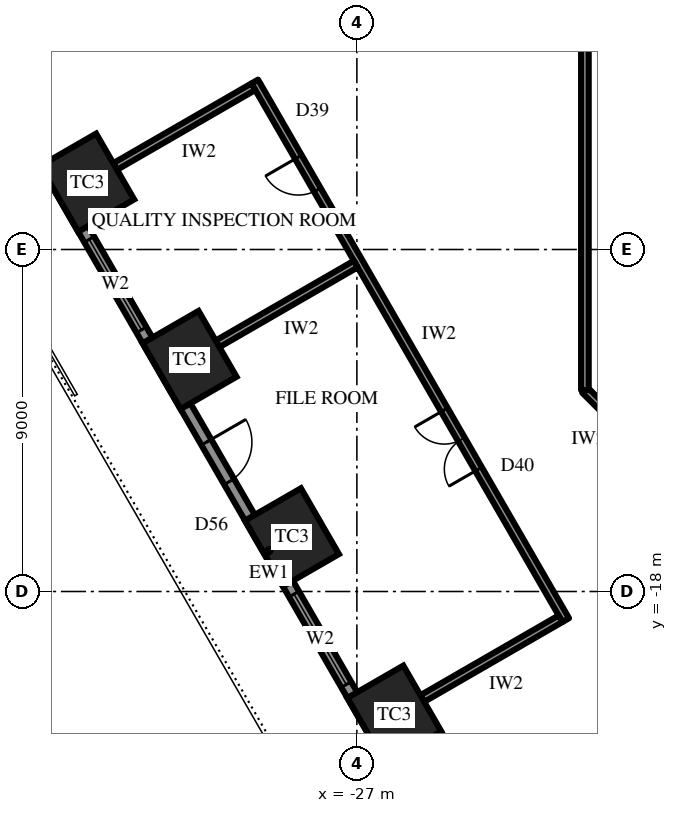
"""IFC4 building model, lengths in metres.
Left out: names, types, materials, properties, quantities, classifications, styles, units other than length and angle.
Written with IfcOpenShell. Run it as: python <this file> out.ifc"""

import sys

from ifc_helpers import new_model, si_unit, direction, frame, frame_2d, origin, origin_2d, place, context, subcontext, project, spatial, rectangle, extrude, element, fill, save


model = new_model("IFC4")
c1 = context("Model", 3, precision=1e-05, world=origin(), true_north=direction((0.0, 1.0)))
c2 = subcontext(c1, "Body", "Model", "MODEL_VIEW")
j1 = project(units=[si_unit("LENGTHUNIT", "METRE"), si_unit("PLANEANGLEUNIT", "RADIAN")], contexts=[c1])
p1 = place(None, origin())
s1 = spatial("IfcSite", under=j1, at=p1, CompositionType="ELEMENT")
p2 = place(p1, origin())
s2 = spatial("IfcBuilding", under=s1, at=p2, CompositionType="ELEMENT")
p3 = place(p2, frame((0.0, 0.0, 69.7)))
s3 = spatial("IfcBuildingStorey", under=s2, at=p3, CompositionType="ELEMENT", Elevation=69.7)
for number, where, z_axis, x_axis in (
    (1, (-34.097, -7.242, 0.0), (0.0, 0.0, 1.0), (0.5, -0.866, 0.0)),
    (2, (-31.403, -11.908, 0.0), (0.0, 0.0, 1.0), (0.5, -0.866, 0.0)),
    (3, (-28.709, -16.575, 0.0), (0.0, 0.0, 1.0), (0.5, -0.866, 0.0)),
    (4, (-26.014, -21.242, 0.0), (0.0, 0.0, 1.0), (0.5, -0.866, 0.0)),
):
    element("IfcColumn", number, at=place(p3, frame(where, z_axis=z_axis, x_axis=x_axis)), inside=s3, PredefinedType="COLUMN", context=c2, shape_type="SweptSolid", body=[
        extrude(rectangle(XDim=2.0, YDim=1.7, at=origin_2d()), origin(), (0.0, 0.0, 1.0), 4.2),
    ])
p4 = place(p3, frame((-37.398, -2.925, 0.0), z_axis=(0.0, 0.0, 1.0), x_axis=(0.499999163675, -0.866025886636, 0.0)))
e5 = element("IfcWall", 5, at=p4, inside=s3, PredefinedType="SOLIDWALL", context=c2, shape_type="SweptSolid", body=[
    extrude(rectangle(XDim=32.332, YDim=0.3, at=frame_2d((16.166, 0.0))), origin(), (0.0, 0.0, 1.0), 2.7),
])
p5 = place(p4, frame((1.319, 0.0, 0.6)))
e6 = element("IfcOpeningElement", 6, at=p5, cuts=e5, PredefinedType="OPENING", context=c2, shape_type="SweptSolid", body=[
    extrude(rectangle(XDim=2.75, YDim=1.85, at=frame_2d((1.375, 0.925))), frame((0.0, 0.16, 0.0), z_axis=(0.0, -1.0, 0.0), x_axis=(1.0, 0.0, 0.0)), (0.0, 0.0, 1.0), 0.32),
])
p6 = place(p4, frame((6.708, 0.0, 0.6)))
e7 = element("IfcOpeningElement", 7, at=p6, cuts=e5, PredefinedType="OPENING", context=c2, shape_type="SweptSolid", body=[
    extrude(rectangle(XDim=2.75, YDim=1.85, at=frame_2d((1.375, 0.925))), frame((0.0, 0.16, 0.0), z_axis=(0.0, -1.0, 0.0), x_axis=(1.0, 0.0, 0.0)), (0.0, 0.0, 1.0), 0.32),
])
p7 = place(p4, frame((12.872, 0.0, 0.0)))
e8 = element("IfcOpeningElement", 8, at=p7, cuts=e5, PredefinedType="OPENING", context=c2, shape_type="SweptSolid", body=[
    extrude(rectangle(XDim=1.2, YDim=2.4, at=frame_2d((0.6, 1.2))), frame((0.0, 0.16, 0.0), z_axis=(0.0, -1.0, 0.0), x_axis=(1.0, 0.0, 0.0)), (0.0, 0.0, 1.0), 0.32),
])
p8 = place(p4, frame((17.485, 0.0, 0.6)))
e9 = element("IfcOpeningElement", 9, at=p8, cuts=e5, PredefinedType="OPENING", context=c2, shape_type="SweptSolid", body=[
    extrude(rectangle(XDim=2.75, YDim=1.85, at=frame_2d((1.375, 0.925))), frame((0.0, 0.16, 0.0), z_axis=(0.0, -1.0, 0.0), x_axis=(1.0, 0.0, 0.0)), (0.0, 0.0, 1.0), 0.32),
])
p9 = place(p4, frame((22.874, 0.0, 0.6)))
e10 = element("IfcOpeningElement", 10, at=p9, cuts=e5, PredefinedType="OPENING", context=c2, shape_type="SweptSolid", body=[
    extrude(rectangle(XDim=2.75, YDim=1.85, at=frame_2d((1.375, 0.925))), frame((0.0, 0.16, 0.0), z_axis=(0.0, -1.0, 0.0), x_axis=(1.0, 0.0, 0.0)), (0.0, 0.0, 1.0), 0.32),
])
p10 = place(p4, frame((28.262, 0.0, 0.6)))
e11 = element("IfcOpeningElement", 11, at=p10, cuts=e5, PredefinedType="OPENING", context=c2, shape_type="SweptSolid", body=[
    extrude(rectangle(XDim=2.75, YDim=1.85, at=frame_2d((1.375, 0.925))), frame((0.0, 0.16, 0.0), z_axis=(0.0, -1.0, 0.0), x_axis=(1.0, 0.0, 0.0)), (0.0, 0.0, 1.0), 0.32),
])
p11 = place(p3, frame((-29.687, -4.58, 0.0), z_axis=(0.0, 0.0, 1.0), x_axis=(0.500000949028, -0.866024855862, 0.0)))
e12 = element("IfcWall", 12, at=p11, inside=s3, PredefinedType="PARTITIONING", context=c2, shape_type="SweptSolid", body=[
    extrude(rectangle(XDim=16.366, YDim=0.2, at=frame_2d((8.183, 0.0))), origin(), (0.0, 0.0, 1.0), 4.0),
])
p12 = place(p11, frame((2.294, 0.0, 0.0)))
e13 = element("IfcOpeningElement", 13, at=p12, cuts=e12, PredefinedType="OPENING", context=c2, shape_type="SweptSolid", body=[
    extrude(rectangle(XDim=1.0, YDim=2.2, at=frame_2d((0.5, 1.1))), frame((0.0, 0.11, 0.0), z_axis=(0.0, -1.0, 0.0), x_axis=(1.0, 0.0, 0.0)), (0.0, 0.0, 1.0), 0.22),
])
p13 = place(p11, frame((9.977, 0.0, 0.0)))
e14 = element("IfcOpeningElement", 14, at=p13, cuts=e12, PredefinedType="OPENING", context=c2, shape_type="SweptSolid", body=[
    extrude(rectangle(XDim=1.8, YDim=2.4, at=frame_2d((0.9, 1.2))), frame((0.0, 0.11, 0.0), z_axis=(0.0, -1.0, 0.0), x_axis=(1.0, 0.0, 0.0)), (0.0, 0.0, 1.0), 0.22),
])
for number, where, z_axis, x_axis in (
    (15, (-29.724, -4.717, 0.0), (0.0, 0.0, 1.0), (-0.866, -0.5, 0.0)),
    (16, (-27.03, -9.383, 0.0), (0.0, 0.0, 1.0), (-0.866, -0.5, 0.0)),
):
    element("IfcWall", number, at=place(p3, frame(where, z_axis=z_axis, x_axis=x_axis)), inside=s3, PredefinedType="PARTITIONING", context=c2, shape_type="SweptSolid", body=[
        extrude(rectangle(XDim=4.2, YDim=0.2, at=frame_2d((2.1, 0.0))), origin(), (0.0, 0.0, 1.0), 2.944),
    ])
p14 = place(p3, frame((-21.641, -18.717, 0.0), z_axis=(0.0, 0.0, 1.0), x_axis=(-0.866009402589, -0.500027713859, 0.0)))
e17 = element("IfcWall", 17, at=p14, inside=s3, PredefinedType="PARTITIONING", context=c2, shape_type="SweptSolid", body=[
    extrude(rectangle(XDim=4.2, YDim=0.2, at=frame_2d((2.1, 0.0))), origin(), (0.0, 0.0, 1.0), 2.992),
])
p15 = place(p3, frame((-19.6, -14.1, 0.0), z_axis=(0.0, 0.0, 1.0), x_axis=(-0.707045124756, 0.707168432242, 0.0)))
e18 = element("IfcWall", 18, at=p15, inside=s3, PredefinedType="PARTITIONING", context=c2, shape_type="SweptSolid", body=[
    extrude(rectangle(XDim=1.98, YDim=0.2, at=frame_2d((0.99, 0.0))), origin(), (0.0, 0.0, 1.0), 4.0),
])
p16 = place(p3, frame((-21.0, -12.7, 0.0), z_axis=(0.0, 0.0, 1.0), x_axis=(0.0, 1.0, 0.0)))
e19 = element("IfcWall", 19, at=p16, inside=s3, PredefinedType="PARTITIONING", context=c2, shape_type="SweptSolid", body=[
    extrude(rectangle(XDim=25.4, YDim=0.2, at=frame_2d((12.7, 0.0))), origin(), (0.0, 0.0, 1.0), 4.0),
])
p17 = place(p16, frame((11.8, 0.0, 0.0)))
e20 = element("IfcOpeningElement", 20, at=p17, cuts=e19, PredefinedType="OPENING", context=c2, shape_type="SweptSolid", body=[
    extrude(rectangle(XDim=1.8, YDim=2.4, at=frame_2d((0.9, 1.2))), frame((0.0, 0.11, 0.0), z_axis=(0.0, -1.0, 0.0), x_axis=(1.0, 0.0, 0.0)), (0.0, 0.0, 1.0), 0.22),
])
p18 = place(p6, origin())
e21 = element("IfcWindow", 21, at=p18, inside=s3, PartitioningType="SINGLE_PANEL", PredefinedType="WINDOW", context=c2, shape_type="SweptSolid", body=[
    extrude(rectangle(XDim=2.75, YDim=1.85, at=frame_2d((1.375, 0.925))), frame((0.0, 0.03, 0.0), z_axis=(0.0, -1.0, 0.0), x_axis=(1.0, 0.0, 0.0)), (0.0, 0.0, 1.0), 0.06),
])
fill(e7, e21)
p19 = place(p7, origin())
e22 = element("IfcDoor", 22, at=p19, inside=s3, OperationType="SINGLE_SWING_RIGHT", PredefinedType="DOOR", context=c2, shape_type="SweptSolid", body=[
    extrude(rectangle(XDim=1.2, YDim=2.4, at=frame_2d((0.6, 1.2))), frame((0.0, 0.025, 0.0), z_axis=(0.0, -1.0, 0.0), x_axis=(1.0, 0.0, 0.0)), (0.0, 0.0, 1.0), 0.05),
])
fill(e8, e22)
p20 = place(p8, origin())
e23 = element("IfcWindow", 23, at=p20, inside=s3, PartitioningType="SINGLE_PANEL", PredefinedType="WINDOW", context=c2, shape_type="SweptSolid", body=[
    extrude(rectangle(XDim=2.75, YDim=1.85, at=frame_2d((1.375, 0.925))), frame((0.0, 0.03, 0.0), z_axis=(0.0, -1.0, 0.0), x_axis=(1.0, 0.0, 0.0)), (0.0, 0.0, 1.0), 0.06),
])
fill(e9, e23)
p21 = place(p12, frame((1.0, 0.0, 0.0), z_axis=(0.0, 0.0, 1.0), x_axis=(-1.0, 0.0, 0.0)))
e24 = element("IfcDoor", 24, at=p21, inside=s3, OperationType="SINGLE_SWING_LEFT", PredefinedType="DOOR", context=c2, shape_type="SweptSolid", body=[
    extrude(rectangle(XDim=1.0, YDim=2.2, at=frame_2d((0.5, 1.1))), frame((0.0, 0.025, 0.0), z_axis=(0.0, -1.0, 0.0), x_axis=(1.0, 0.0, 0.0)), (0.0, 0.0, 1.0), 0.05),
])
fill(e13, e24)
p22 = place(p13, frame((1.8, 0.0, 0.0), z_axis=(0.0, 0.0, 1.0), x_axis=(-1.0, 0.0, 0.0)))
e25 = element("IfcDoor", 25, at=p22, inside=s3, OperationType="DOUBLE_DOOR_SINGLE_SWING", PredefinedType="DOOR", context=c2, shape_type="SweptSolid", body=[
    extrude(rectangle(XDim=1.8, YDim=2.4, at=frame_2d((0.9, 1.2))), frame((0.0, 0.025, 0.0), z_axis=(0.0, -1.0, 0.0), x_axis=(1.0, 0.0, 0.0)), (0.0, 0.0, 1.0), 0.05),
])
fill(e14, e25)
save(model, sys.argv[1])
